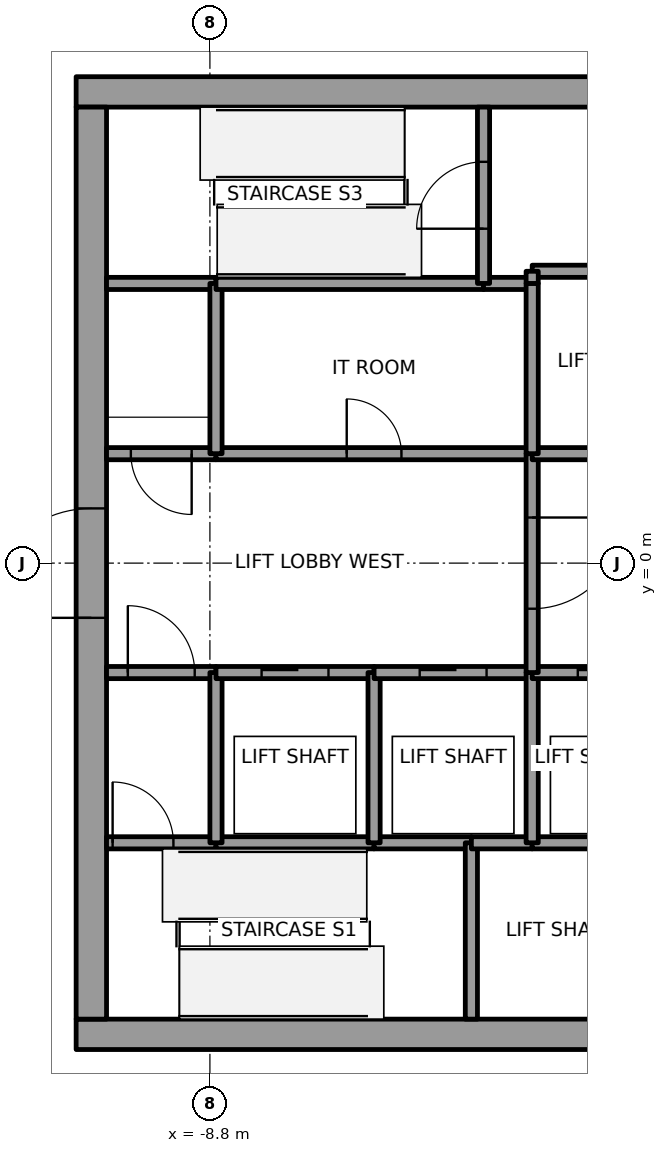
"""IFC4 building model, lengths in metres.
Left out: names, types, materials, properties, quantities, classifications, styles, units other than length and angle.
Written with IfcOpenShell. Run it as: python <this file> out.ifc"""

import sys

from ifc_helpers import new_model, si_unit, direction, frame, frame_2d, origin, place, context, subcontext, project, spatial, rectangle, extrude, element, fill, save


model = new_model("IFC4")
c1 = context("Model", 3, precision=1e-05, world=origin(), true_north=direction((0.0, 1.0)))
c2 = subcontext(c1, "Body", "Model", "MODEL_VIEW")
j1 = project(units=[si_unit("LENGTHUNIT", "METRE"), si_unit("PLANEANGLEUNIT", "RADIAN")], contexts=[c1])
p1 = place(None, origin())
s1 = spatial("IfcSite", under=j1, at=p1, CompositionType="ELEMENT")
p2 = place(p1, origin())
s2 = spatial("IfcBuilding", under=s1, at=p2, CompositionType="ELEMENT")
p3 = place(p2, frame((0.0, 0.0, 227.0)))
s3 = spatial("IfcBuildingStorey", under=s2, at=p3, CompositionType="ELEMENT", Elevation=227.0)
p4 = place(p3, frame((-11.0, -7.75, 0.0), z_axis=(0.0, 0.0, 1.0), x_axis=(1.0, 0.0, 0.0)))
e1 = element("IfcWall", 1, at=p4, inside=s3, PredefinedType="SHEAR", context=c2, shape_type="SweptSolid", body=[
    extrude(rectangle(XDim=22.0, YDim=0.5, at=frame_2d((11.0, 0.0))), origin(), (0.0, 0.0, 1.0), 4.0),
])
p5 = place(p4, frame((10.45, 0.0, 0.0)))
e2 = element("IfcOpeningElement", 2, at=p5, cuts=e1, PredefinedType="OPENING", context=c2, shape_type="SweptSolid", body=[
    extrude(rectangle(XDim=1.1, YDim=2.1, at=frame_2d((0.55, 1.05))), frame((0.0, 0.25, 0.0), z_axis=(0.0, -1.0, 0.0), x_axis=(1.0, 0.0, 0.0)), (0.0, 0.0, 1.0), 0.5),
])
p6 = place(p3, frame((-11.0, 7.75, 0.0), z_axis=(0.0, 0.0, 1.0), x_axis=(1.0, 0.0, 0.0)))
e3 = element("IfcWall", 3, at=p6, inside=s3, PredefinedType="SHEAR", context=c2, shape_type="SweptSolid", body=[
    extrude(rectangle(XDim=22.0, YDim=0.5, at=frame_2d((11.0, 0.0))), origin(), (0.0, 0.0, 1.0), 4.0),
])
p7 = place(p6, frame((10.45, 0.0, 0.0)))
e4 = element("IfcOpeningElement", 4, at=p7, cuts=e3, PredefinedType="OPENING", context=c2, shape_type="SweptSolid", body=[
    extrude(rectangle(XDim=1.1, YDim=2.1, at=frame_2d((0.55, 1.05))), frame((0.0, 0.25, 0.0), z_axis=(0.0, -1.0, 0.0), x_axis=(1.0, 0.0, 0.0)), (0.0, 0.0, 1.0), 0.5),
])
p8 = place(p3, frame((-10.75, -7.5, 0.0), z_axis=(0.0, 0.0, 1.0), x_axis=(0.0, 1.0, 0.0)))
e5 = element("IfcWall", 5, at=p8, inside=s3, PredefinedType="SHEAR", context=c2, shape_type="SweptSolid", body=[
    extrude(rectangle(XDim=15.0, YDim=0.5, at=frame_2d((7.5, 0.0))), origin(), (0.0, 0.0, 1.0), 4.0),
])
p9 = place(p8, frame((6.6, 0.0, 0.0)))
e6 = element("IfcOpeningElement", 6, at=p9, cuts=e5, PredefinedType="OPENING", context=c2, shape_type="SweptSolid", body=[
    extrude(rectangle(XDim=1.8, YDim=2.1, at=frame_2d((0.9, 1.05))), frame((0.0, 0.25, 0.0), z_axis=(0.0, -1.0, 0.0), x_axis=(1.0, 0.0, 0.0)), (0.0, 0.0, 1.0), 0.5),
])
p10 = place(p3, frame((-10.5, -4.6, 0.0), z_axis=(0.0, 0.0, 1.0), x_axis=(1.0, 0.0, 0.0)))
e7 = element("IfcWall", 7, at=p10, inside=s3, PredefinedType="SOLIDWALL", context=c2, shape_type="SweptSolid", body=[
    extrude(rectangle(XDim=1.8, YDim=0.2, at=frame_2d((0.9, 0.0))), origin(), (0.0, 0.0, 1.0), 3.85),
])
p11 = place(p10, frame((0.1, 0.0, 0.0)))
e8 = element("IfcOpeningElement", 8, at=p11, cuts=e7, PredefinedType="OPENING", context=c2, shape_type="SweptSolid", body=[
    extrude(rectangle(XDim=1.0, YDim=2.1, at=frame_2d((0.5, 1.05))), frame((0.0, 0.1, 0.0), z_axis=(0.0, -1.0, 0.0), x_axis=(1.0, 0.0, 0.0)), (0.0, 0.0, 1.0), 0.2),
])
p12 = place(p3, frame((-10.5, -1.8, 0.0), z_axis=(0.0, 0.0, 1.0), x_axis=(1.0, 0.0, 0.0)))
e9 = element("IfcWall", 9, at=p12, inside=s3, PredefinedType="SOLIDWALL", context=c2, shape_type="SweptSolid", body=[
    extrude(rectangle(XDim=1.8, YDim=0.2, at=frame_2d((0.9, 0.0))), origin(), (0.0, 0.0, 1.0), 3.85),
])
p13 = place(p12, frame((0.35, 0.0, 0.0)))
e10 = element("IfcOpeningElement", 10, at=p13, cuts=e9, PredefinedType="OPENING", context=c2, shape_type="SweptSolid", body=[
    extrude(rectangle(XDim=1.1, YDim=2.1, at=frame_2d((0.55, 1.05))), frame((0.0, 0.1, 0.0), z_axis=(0.0, -1.0, 0.0), x_axis=(1.0, 0.0, 0.0)), (0.0, 0.0, 1.0), 0.2),
])
p14 = place(p3, frame((-8.7, 1.8, 0.0), z_axis=(0.0, 0.0, 1.0), x_axis=(-1.0, 0.0, 0.0)))
e11 = element("IfcWall", 11, at=p14, inside=s3, PredefinedType="SOLIDWALL", context=c2, shape_type="SweptSolid", body=[
    extrude(rectangle(XDim=1.8, YDim=0.2, at=frame_2d((0.9, 0.0))), origin(), (0.0, 0.0, 1.0), 3.85),
])
p15 = place(p14, frame((0.4, 0.0, 0.0)))
e12 = element("IfcOpeningElement", 12, at=p15, cuts=e11, PredefinedType="OPENING", context=c2, shape_type="SweptSolid", body=[
    extrude(rectangle(XDim=1.0, YDim=2.1, at=frame_2d((0.5, 1.05))), frame((0.0, 0.1, 0.0), z_axis=(0.0, -1.0, 0.0), x_axis=(1.0, 0.0, 0.0)), (0.0, 0.0, 1.0), 0.2),
])
p16 = place(p3, frame((-8.7, 4.6, 0.0), z_axis=(0.0, 0.0, 1.0), x_axis=(-1.0, 0.0, 0.0)))
e13 = element("IfcWall", 13, at=p16, inside=s3, PredefinedType="SOLIDWALL", context=c2, shape_type="SweptSolid", body=[
    extrude(rectangle(XDim=1.8, YDim=0.2, at=frame_2d((0.9, 0.0))), origin(), (0.0, 0.0, 1.0), 3.85),
])
p17 = place(p3, frame((-8.7, -4.6, 0.0), z_axis=(0.0, 0.0, 1.0), x_axis=(1.0, 0.0, 0.0)))
e14 = element("IfcWall", 14, at=p17, inside=s3, PredefinedType="SOLIDWALL", context=c2, shape_type="SweptSolid", body=[
    extrude(rectangle(XDim=2.6, YDim=0.2, at=frame_2d((1.3, 0.0))), origin(), (0.0, 0.0, 1.0), 3.85),
])
p18 = place(p3, frame((-8.7, -4.6, 0.0), z_axis=(0.0, 0.0, 1.0), x_axis=(0.0, 1.0, 0.0)))
e15 = element("IfcWall", 15, at=p18, inside=s3, PredefinedType="SOLIDWALL", context=c2, shape_type="SweptSolid", body=[
    extrude(rectangle(XDim=2.8, YDim=0.2, at=frame_2d((1.4, 0.0))), origin(), (0.0, 0.0, 1.0), 3.85),
])
p19 = place(p3, frame((-8.7, -1.8, 0.0), z_axis=(0.0, 0.0, 1.0), x_axis=(1.0, 0.0, 0.0)))
e16 = element("IfcWall", 16, at=p19, inside=s3, PredefinedType="SOLIDWALL", context=c2, shape_type="SweptSolid", body=[
    extrude(rectangle(XDim=2.6, YDim=0.2, at=frame_2d((1.3, 0.0))), origin(), (0.0, 0.0, 1.0), 3.85),
])
p20 = place(p19, frame((0.75, 0.0, 0.0)))
e17 = element("IfcOpeningElement", 17, at=p20, cuts=e16, PredefinedType="OPENING", context=c2, shape_type="SweptSolid", body=[
    extrude(rectangle(XDim=1.1, YDim=2.1, at=frame_2d((0.55, 1.05))), frame((0.0, 0.1, 0.0), z_axis=(0.0, -1.0, 0.0), x_axis=(1.0, 0.0, 0.0)), (0.0, 0.0, 1.0), 0.2),
])
p21 = place(p3, frame((-8.7, 1.8, 0.0), z_axis=(0.0, 0.0, 1.0), x_axis=(1.0, 0.0, 0.0)))
e18 = element("IfcWall", 18, at=p21, inside=s3, PredefinedType="SOLIDWALL", context=c2, shape_type="SweptSolid", body=[
    extrude(rectangle(XDim=5.2, YDim=0.2, at=frame_2d((2.6, 0.0))), origin(), (0.0, 0.0, 1.0), 3.85),
])
p22 = place(p21, frame((2.15, 0.0, 0.0)))
e19 = element("IfcOpeningElement", 19, at=p22, cuts=e18, PredefinedType="OPENING", context=c2, shape_type="SweptSolid", body=[
    extrude(rectangle(XDim=0.9, YDim=2.1, at=frame_2d((0.45, 1.05))), frame((0.0, 0.1, 0.0), z_axis=(0.0, -1.0, 0.0), x_axis=(1.0, 0.0, 0.0)), (0.0, 0.0, 1.0), 0.2),
])
p23 = place(p3, frame((-8.7, 4.6, 0.0), z_axis=(0.0, 0.0, 1.0), x_axis=(0.0, -1.0, 0.0)))
e20 = element("IfcWall", 20, at=p23, inside=s3, PredefinedType="SOLIDWALL", context=c2, shape_type="SweptSolid", body=[
    extrude(rectangle(XDim=2.8, YDim=0.2, at=frame_2d((1.4, 0.0))), origin(), (0.0, 0.0, 1.0), 3.85),
])
p24 = place(p3, frame((-4.3, 4.6, 0.0), z_axis=(0.0, 0.0, 1.0), x_axis=(-1.0, 0.0, 0.0)))
e21 = element("IfcWall", 21, at=p24, inside=s3, PredefinedType="SOLIDWALL", context=c2, shape_type="SweptSolid", body=[
    extrude(rectangle(XDim=4.4, YDim=0.2, at=frame_2d((2.2, 0.0))), origin(), (0.0, 0.0, 1.0), 3.85),
])
p25 = place(p3, frame((-6.1, -4.6, 0.0), z_axis=(0.0, 0.0, 1.0), x_axis=(1.0, 0.0, 0.0)))
e22 = element("IfcWall", 22, at=p25, inside=s3, PredefinedType="SOLIDWALL", context=c2, shape_type="SweptSolid", body=[
    extrude(rectangle(XDim=1.6, YDim=0.2, at=frame_2d((0.8, 0.0))), origin(), (0.0, 0.0, 1.0), 3.85),
])
p26 = place(p3, frame((-6.1, -4.6, 0.0), z_axis=(0.0, 0.0, 1.0), x_axis=(0.0, 1.0, 0.0)))
e23 = element("IfcWall", 23, at=p26, inside=s3, PredefinedType="SOLIDWALL", context=c2, shape_type="SweptSolid", body=[
    extrude(rectangle(XDim=2.8, YDim=0.2, at=frame_2d((1.4, 0.0))), origin(), (0.0, 0.0, 1.0), 3.85),
])
p27 = place(p3, frame((-6.1, -1.8, 0.0), z_axis=(0.0, 0.0, 1.0), x_axis=(1.0, 0.0, 0.0)))
e24 = element("IfcWall", 24, at=p27, inside=s3, PredefinedType="SOLIDWALL", context=c2, shape_type="SweptSolid", body=[
    extrude(rectangle(XDim=2.6, YDim=0.2, at=frame_2d((1.3, 0.0))), origin(), (0.0, 0.0, 1.0), 3.85),
])
p28 = place(p27, frame((0.75, 0.0, 0.0)))
e25 = element("IfcOpeningElement", 25, at=p28, cuts=e24, PredefinedType="OPENING", context=c2, shape_type="SweptSolid", body=[
    extrude(rectangle(XDim=1.1, YDim=2.1, at=frame_2d((0.55, 1.05))), frame((0.0, 0.1, 0.0), z_axis=(0.0, -1.0, 0.0), x_axis=(1.0, 0.0, 0.0)), (0.0, 0.0, 1.0), 0.2),
])
p29 = place(p3, frame((-4.5, -4.6, 0.0), z_axis=(0.0, 0.0, 1.0), x_axis=(0.0, -1.0, 0.0)))
e26 = element("IfcWall", 26, at=p29, inside=s3, PredefinedType="SOLIDWALL", context=c2, shape_type="SweptSolid", body=[
    extrude(rectangle(XDim=2.9, YDim=0.2, at=frame_2d((1.45, 0.0))), origin(), (0.0, 0.0, 1.0), 3.85),
])
p30 = place(p3, frame((-4.5, -4.6, 0.0), z_axis=(0.0, 0.0, 1.0), x_axis=(1.0, 0.0, 0.0)))
e27 = element("IfcWall", 27, at=p30, inside=s3, PredefinedType="SOLIDWALL", context=c2, shape_type="SweptSolid", body=[
    extrude(rectangle(XDim=1.0, YDim=0.2, at=frame_2d((0.5, 0.0))), origin(), (0.0, 0.0, 1.0), 3.85),
])
p31 = place(p3, frame((-3.5, 4.6, 0.0), z_axis=(0.0, 0.0, 1.0), x_axis=(-1.0, 0.0, 0.0)))
e28 = element("IfcWall", 28, at=p31, inside=s3, PredefinedType="SOLIDWALL", context=c2, shape_type="SweptSolid", body=[
    extrude(rectangle(XDim=0.8, YDim=0.2, at=frame_2d((0.4, 0.0))), origin(), (0.0, 0.0, 1.0), 3.85),
])
p32 = place(p3, frame((-4.3, 4.6, 0.0), z_axis=(0.0, 0.0, 1.0), x_axis=(0.0, 1.0, 0.0)))
e29 = element("IfcWall", 29, at=p32, inside=s3, PredefinedType="SOLIDWALL", context=c2, shape_type="SweptSolid", body=[
    extrude(rectangle(XDim=2.9, YDim=0.2, at=frame_2d((1.45, 0.0))), origin(), (0.0, 0.0, 1.0), 3.85),
])
p33 = place(p32, frame((0.9, 0.0, 0.0)))
e30 = element("IfcOpeningElement", 30, at=p33, cuts=e29, PredefinedType="OPENING", context=c2, shape_type="SweptSolid", body=[
    extrude(rectangle(XDim=1.1, YDim=2.1, at=frame_2d((0.55, 1.05))), frame((0.0, 0.1, 0.0), z_axis=(0.0, -1.0, 0.0), x_axis=(1.0, 0.0, 0.0)), (0.0, 0.0, 1.0), 0.2),
])
p34 = place(p3, frame((-3.5, -4.6, 0.0), z_axis=(0.0, 0.0, 1.0), x_axis=(1.0, 0.0, 0.0)))
e31 = element("IfcWall", 31, at=p34, inside=s3, PredefinedType="SOLIDWALL", context=c2, shape_type="SweptSolid", body=[
    extrude(rectangle(XDim=1.9, YDim=0.2, at=frame_2d((0.95, 0.0))), origin(), (0.0, 0.0, 1.0), 3.85),
])
p35 = place(p3, frame((-3.5, -4.6, 0.0), z_axis=(0.0, 0.0, 1.0), x_axis=(0.0, 1.0, 0.0)))
e32 = element("IfcWall", 32, at=p35, inside=s3, PredefinedType="SOLIDWALL", context=c2, shape_type="SweptSolid", body=[
    extrude(rectangle(XDim=2.8, YDim=0.2, at=frame_2d((1.4, 0.0))), origin(), (0.0, 0.0, 1.0), 3.85),
])
p36 = place(p3, frame((-3.5, -1.8, 0.0), z_axis=(0.0, 0.0, 1.0), x_axis=(1.0, 0.0, 0.0)))
e33 = element("IfcWall", 33, at=p36, inside=s3, PredefinedType="SOLIDWALL", context=c2, shape_type="SweptSolid", body=[
    extrude(rectangle(XDim=2.6, YDim=0.2, at=frame_2d((1.3, 0.0))), origin(), (0.0, 0.0, 1.0), 3.85),
])
p37 = place(p36, frame((0.75, 0.0, 0.0)))
e34 = element("IfcOpeningElement", 34, at=p37, cuts=e33, PredefinedType="OPENING", context=c2, shape_type="SweptSolid", body=[
    extrude(rectangle(XDim=1.1, YDim=2.1, at=frame_2d((0.55, 1.05))), frame((0.0, 0.1, 0.0), z_axis=(0.0, -1.0, 0.0), x_axis=(1.0, 0.0, 0.0)), (0.0, 0.0, 1.0), 0.2),
])
p38 = place(p3, frame((-3.5, 1.8, 0.0), z_axis=(0.0, 0.0, 1.0), x_axis=(0.0, -1.0, 0.0)))
e35 = element("IfcWall", 35, at=p38, inside=s3, PredefinedType="SOLIDWALL", context=c2, shape_type="SweptSolid", body=[
    extrude(rectangle(XDim=3.6, YDim=0.2, at=frame_2d((1.8, 0.0))), origin(), (0.0, 0.0, 1.0), 3.85),
])
p39 = place(p38, frame((1.05, 0.0, 0.0)))
e36 = element("IfcOpeningElement", 36, at=p39, cuts=e35, PredefinedType="OPENING", context=c2, shape_type="SweptSolid", body=[
    extrude(rectangle(XDim=1.5, YDim=2.1, at=frame_2d((0.75, 1.05))), frame((0.0, 0.1, 0.0), z_axis=(0.0, -1.0, 0.0), x_axis=(1.0, 0.0, 0.0)), (0.0, 0.0, 1.0), 0.2),
])
p40 = place(p3, frame((-0.9, 1.8, 0.0), z_axis=(0.0, 0.0, 1.0), x_axis=(-1.0, 0.0, 0.0)))
e37 = element("IfcWall", 37, at=p40, inside=s3, PredefinedType="SOLIDWALL", context=c2, shape_type="SweptSolid", body=[
    extrude(rectangle(XDim=2.6, YDim=0.2, at=frame_2d((1.3, 0.0))), origin(), (0.0, 0.0, 1.0), 3.85),
])
p41 = place(p3, frame((-3.5, 1.8, 0.0), z_axis=(0.0, 0.0, 1.0), x_axis=(0.0, 1.0, 0.0)))
e38 = element("IfcWall", 38, at=p41, inside=s3, PredefinedType="SOLIDWALL", context=c2, shape_type="SweptSolid", body=[
    extrude(rectangle(XDim=2.8, YDim=0.2, at=frame_2d((1.4, 0.0))), origin(), (0.0, 0.0, 1.0), 3.85),
])
p42 = place(p3, frame((-0.9, 4.8, 0.0), z_axis=(0.0, 0.0, 1.0), x_axis=(-1.0, 0.0, 0.0)))
e39 = element("IfcWall", 39, at=p42, inside=s3, PredefinedType="SOLIDWALL", context=c2, shape_type="SweptSolid", body=[
    extrude(rectangle(XDim=2.6, YDim=0.2, at=frame_2d((1.3, 0.0))), origin(), (0.0, 0.0, 1.0), 3.85),
])
p43 = place(p3, frame((-3.5, 4.8, 0.0), z_axis=(0.0, 0.0, 1.0), x_axis=(0.0, -1.0, 0.0)))
e40 = element("IfcWall", 40, at=p43, inside=s3, PredefinedType="SOLIDWALL", context=c2, shape_type="SweptSolid", body=[
    extrude(rectangle(XDim=0.2, YDim=0.2, at=frame_2d((0.1, 0.0))), origin(), (0.0, 0.0, 1.0), 3.85),
])
p44 = place(p20, origin())
e41 = element("IfcDoor", 41, at=p44, inside=s3, OperationType="SLIDING_TO_LEFT", PredefinedType="DOOR", context=c2, shape_type="SweptSolid", body=[
    extrude(rectangle(XDim=1.1, YDim=2.1, at=frame_2d((0.55, 1.05))), frame((0.0, 0.025, 0.0), z_axis=(0.0, -1.0, 0.0), x_axis=(1.0, 0.0, 0.0)), (0.0, 0.0, 1.0), 0.05),
])
fill(e17, e41)
p45 = place(p28, origin())
e42 = element("IfcDoor", 42, at=p45, inside=s3, OperationType="SLIDING_TO_RIGHT", PredefinedType="DOOR", context=c2, shape_type="SweptSolid", body=[
    extrude(rectangle(XDim=1.1, YDim=2.1, at=frame_2d((0.55, 1.05))), frame((0.0, 0.025, 0.0), z_axis=(0.0, -1.0, 0.0), x_axis=(1.0, 0.0, 0.0)), (0.0, 0.0, 1.0), 0.05),
])
fill(e25, e42)
p46 = place(p37, origin())
e43 = element("IfcDoor", 43, at=p46, inside=s3, OperationType="SLIDING_TO_RIGHT", PredefinedType="DOOR", context=c2, shape_type="SweptSolid", body=[
    extrude(rectangle(XDim=1.1, YDim=2.1, at=frame_2d((0.55, 1.05))), frame((0.0, 0.025, 0.0), z_axis=(0.0, -1.0, 0.0), x_axis=(1.0, 0.0, 0.0)), (0.0, 0.0, 1.0), 0.05),
])
fill(e34, e43)
p47 = place(p39, origin())
e44 = element("IfcDoor", 44, at=p47, inside=s3, OperationType="DOUBLE_DOOR_SINGLE_SWING", PredefinedType="DOOR", context=c2, shape_type="SweptSolid", body=[
    extrude(rectangle(XDim=1.5, YDim=2.1, at=frame_2d((0.75, 1.05))), frame((0.0, 0.025, 0.0), z_axis=(0.0, -1.0, 0.0), x_axis=(1.0, 0.0, 0.0)), (0.0, 0.0, 1.0), 0.05),
])
fill(e36, e44)
p48 = place(p13, origin())
e45 = element("IfcDoor", 45, at=p48, inside=s3, OperationType="SINGLE_SWING_LEFT", PredefinedType="DOOR", context=c2, shape_type="SweptSolid", body=[
    extrude(rectangle(XDim=1.1, YDim=2.1, at=frame_2d((0.55, 1.05))), frame((0.0, 0.025, 0.0), z_axis=(0.0, -1.0, 0.0), x_axis=(1.0, 0.0, 0.0)), (0.0, 0.0, 1.0), 0.05),
])
fill(e10, e45)
p49 = place(p15, origin())
e46 = element("IfcDoor", 46, at=p49, inside=s3, OperationType="SINGLE_SWING_RIGHT", PredefinedType="DOOR", context=c2, shape_type="SweptSolid", body=[
    extrude(rectangle(XDim=1.0, YDim=2.1, at=frame_2d((0.5, 1.05))), frame((0.0, 0.025, 0.0), z_axis=(0.0, -1.0, 0.0), x_axis=(1.0, 0.0, 0.0)), (0.0, 0.0, 1.0), 0.05),
])
fill(e12, e46)
p50 = place(p11, origin())
e47 = element("IfcDoor", 47, at=p50, inside=s3, OperationType="SINGLE_SWING_LEFT", PredefinedType="DOOR", context=c2, shape_type="SweptSolid", body=[
    extrude(rectangle(XDim=1.0, YDim=2.1, at=frame_2d((0.5, 1.05))), frame((0.0, 0.025, 0.0), z_axis=(0.0, -1.0, 0.0), x_axis=(1.0, 0.0, 0.0)), (0.0, 0.0, 1.0), 0.05),
])
fill(e8, e47)
p51 = place(p33, origin())
e48 = element("IfcDoor", 48, at=p51, inside=s3, OperationType="SINGLE_SWING_LEFT", PredefinedType="DOOR", context=c2, shape_type="SweptSolid", body=[
    extrude(rectangle(XDim=1.1, YDim=2.1, at=frame_2d((0.55, 1.05))), frame((0.0, 0.025, 0.0), z_axis=(0.0, -1.0, 0.0), x_axis=(1.0, 0.0, 0.0)), (0.0, 0.0, 1.0), 0.05),
])
fill(e30, e48)
p52 = place(p22, origin())
e49 = element("IfcDoor", 49, at=p52, inside=s3, OperationType="SINGLE_SWING_LEFT", PredefinedType="DOOR", context=c2, shape_type="SweptSolid", body=[
    extrude(rectangle(XDim=0.9, YDim=2.1, at=frame_2d((0.45, 1.05))), frame((0.0, 0.025, 0.0), z_axis=(0.0, -1.0, 0.0), x_axis=(1.0, 0.0, 0.0)), (0.0, 0.0, 1.0), 0.05),
])
fill(e19, e49)
p53 = place(p9, origin())
e50 = element("IfcDoor", 50, at=p53, inside=s3, OperationType="DOUBLE_DOOR_SINGLE_SWING", PredefinedType="DOOR", context=c2, shape_type="SweptSolid", body=[
    extrude(rectangle(XDim=1.8, YDim=2.1, at=frame_2d((0.9, 1.05))), frame((0.0, 0.025, 0.0), z_axis=(0.0, -1.0, 0.0), x_axis=(1.0, 0.0, 0.0)), (0.0, 0.0, 1.0), 0.05),
])
fill(e6, e50)
save(model, sys.argv[1])
